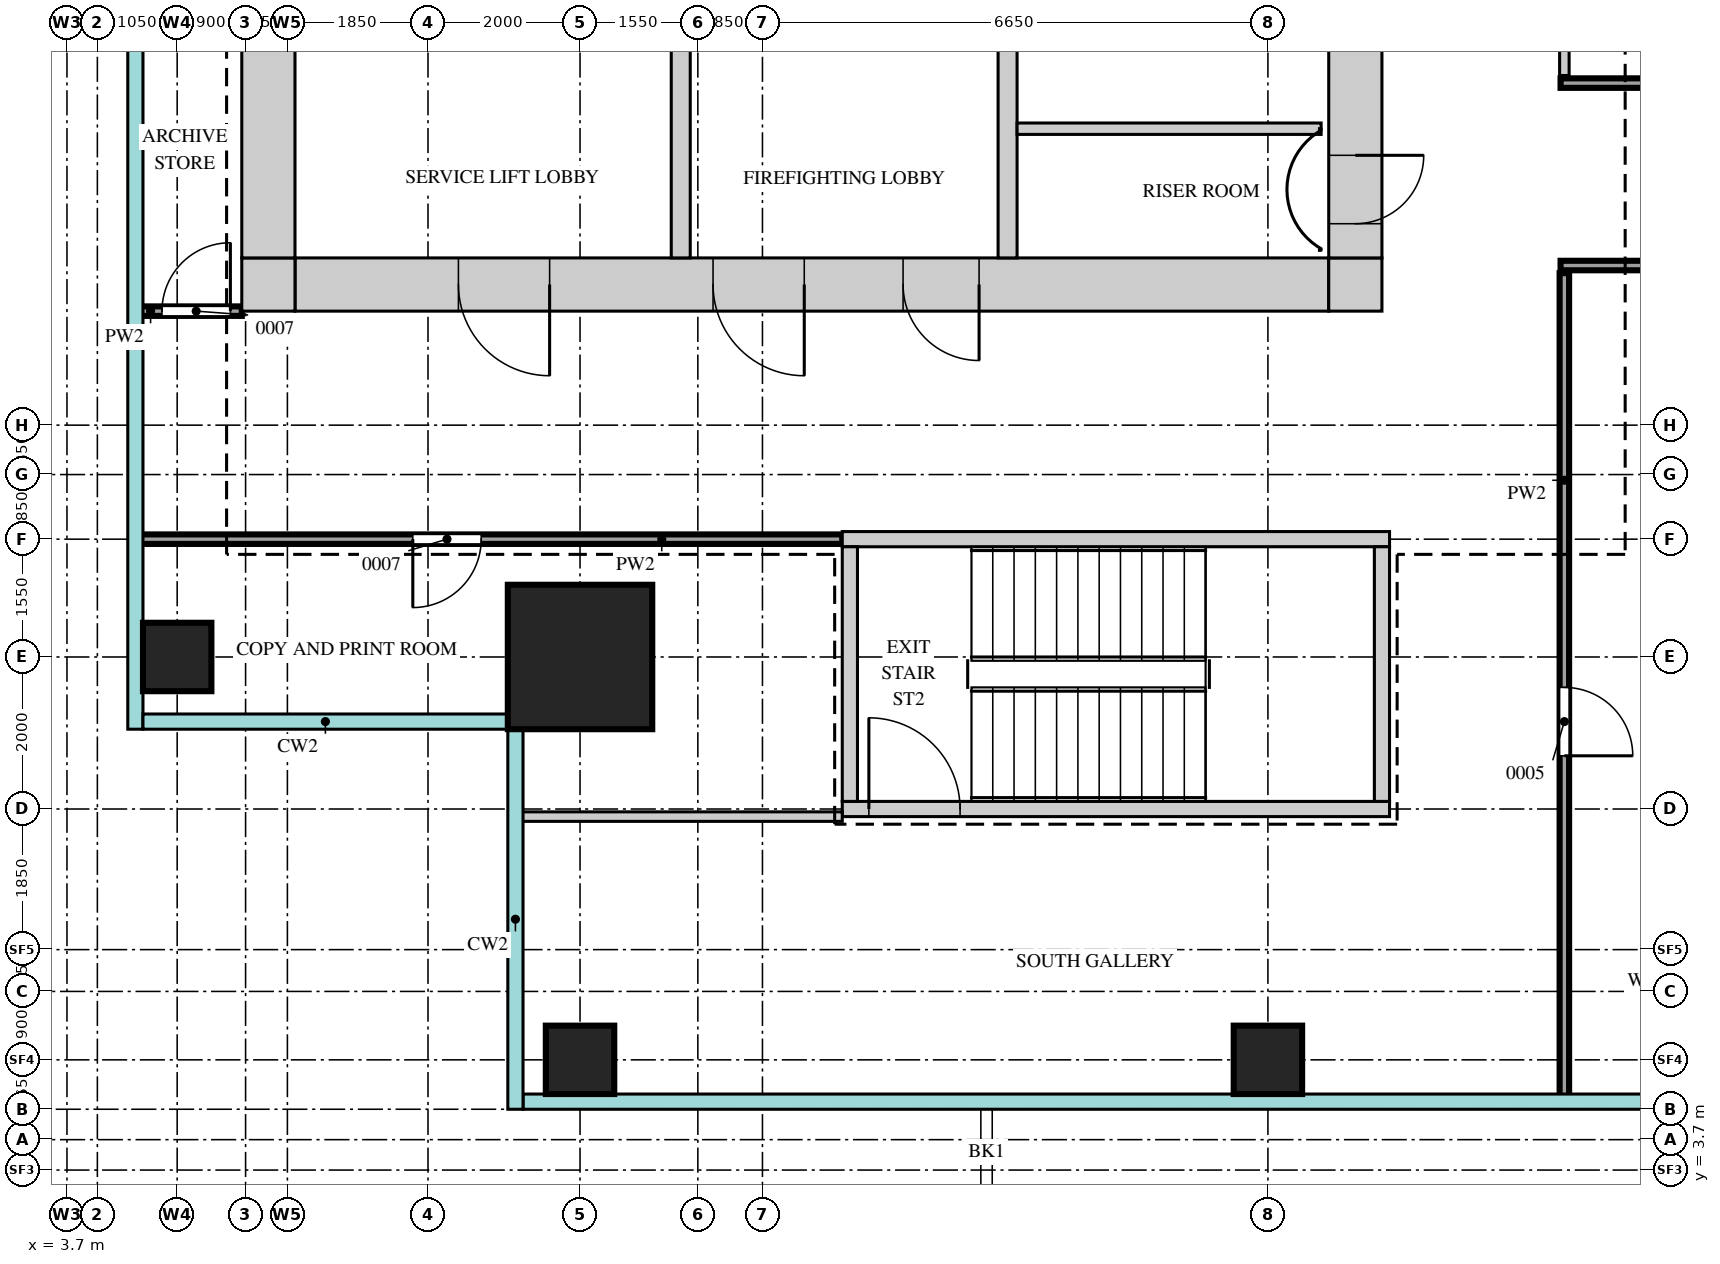
"""IFC4 building model, lengths in metres.
Left out: names, types, materials, properties, quantities, classifications, styles, units other than length and angle.
Written with IfcOpenShell. Run it as: python <this file> out.ifc"""

import sys

from ifc_helpers import new_model, si_unit, direction, frame, frame_2d, origin, origin_2d, place, context, subcontext, project, spatial, rectangle, extrude, source, transform, mapped, element, fill, save


model = new_model("IFC4")
c1 = context("Model", 3, precision=1e-05, world=origin(), true_north=direction((0.0, 1.0)))
c2 = subcontext(c1, "Body", "Model", "MODEL_VIEW")
j1 = project(units=[si_unit("LENGTHUNIT", "METRE"), si_unit("PLANEANGLEUNIT", "RADIAN")], contexts=[c1])
p1 = place(None, origin())
s1 = spatial("IfcSite", under=j1, at=p1, CompositionType="ELEMENT")
p2 = place(p1, origin())
s2 = spatial("IfcBuilding", under=s1, at=p2, CompositionType="ELEMENT")
p3 = place(p2, frame((0.0, 0.0, 226.2)))
s3 = spatial("IfcBuildingStorey", under=s2, at=p3, CompositionType="ELEMENT", Elevation=226.2)
m1 = source(origin(), c2, "Body", "SweptSolid", [
    extrude(rectangle(XDim=13.6, YDim=0.7, at=frame_2d((6.8, 0.0))), origin(), (0.0, 0.0, 1.0), 3.75),
])
p4 = place(p3, frame((6.7, 15.35, 0.0), z_axis=(0.0, 0.0, 1.0), x_axis=(1.0, 0.0, 0.0)))
e1 = element("IfcWall", 1, at=p4, inside=s3, PredefinedType="SHEAR", context=c2, shape_type="MappedRepresentation", body=[
    mapped(m1, transform((0.0, 0.0, 0.0))),
])
m2 = source(origin(), c2, "Body", "SweptSolid", [
    extrude(rectangle(XDim=1.2, YDim=2.1, at=frame_2d((0.6, 1.05))), frame((0.0, 0.36, 0.0), z_axis=(0.0, -1.0, 0.0), x_axis=(1.0, 0.0, 0.0)), (0.0, 0.0, 1.0), 0.72),
])
p5 = place(p4, frame((5.5, 0.0, 0.0)))
e2 = element("IfcOpeningElement", 2, at=p5, cuts=e1, PredefinedType="OPENING", context=c2, shape_type="MappedRepresentation", body=[
    mapped(m2, transform((0.0, 0.0, 0.0))),
])
p6 = place(p4, frame((2.15, 0.0, 0.0)))
e3 = element("IfcOpeningElement", 3, at=p6, cuts=e1, PredefinedType="OPENING", context=c2, shape_type="MappedRepresentation", body=[
    mapped(m2, transform((0.0, 0.0, 0.0))),
])
m3 = source(origin(), c2, "Body", "SweptSolid", [
    extrude(rectangle(XDim=1.0, YDim=2.1, at=frame_2d((0.5, 1.05))), frame((0.0, 0.36, 0.0), z_axis=(0.0, -1.0, 0.0), x_axis=(1.0, 0.0, 0.0)), (0.0, 0.0, 1.0), 0.72),
])
p7 = place(p4, frame((8.0, 0.0, 0.0)))
e4 = element("IfcOpeningElement", 4, at=p7, cuts=e1, PredefinedType="OPENING", context=c2, shape_type="MappedRepresentation", body=[
    mapped(m3, transform((0.0, 0.0, 0.0))),
])
m4 = source(origin(), c2, "Body", "SweptSolid", [
    extrude(rectangle(XDim=0.7, YDim=0.7, at=frame_2d((0.35, 0.0))), origin(), (0.0, 0.0, 1.0), 3.75),
])
for number, where, z_axis, x_axis in (
    (5, (20.3, 15.35, 0.0), (0.0, 0.0, 1.0), (1.0, 0.0, 0.0)),
    (6, (6.0, 15.35, 0.0), (0.0, 0.0, 1.0), (1.0, 0.0, 0.0)),
):
    element("IfcWall", number, at=place(p3, frame(where, z_axis=z_axis, x_axis=x_axis)), inside=s3, PredefinedType="SHEAR", context=c2, shape_type="MappedRepresentation", body=[
        mapped(m4, transform((0.0, 0.0, 0.0))),
    ])
m5 = source(origin(), c2, "Body", "SweptSolid", [
    extrude(rectangle(XDim=22.6, YDim=0.7, at=frame_2d((11.3, 0.0))), origin(), (0.0, 0.0, 1.0), 3.75),
])
p8 = place(p3, frame((20.65, 15.7, 0.0), z_axis=(0.0, 0.0, 1.0), x_axis=(0.0, 1.0, 0.0)))
e7 = element("IfcWall", 7, at=p8, inside=s3, PredefinedType="SHEAR", context=c2, shape_type="MappedRepresentation", body=[
    mapped(m5, transform((0.0, 0.0, 0.0))),
])
m6 = source(origin(), c2, "Body", "SweptSolid", [
    extrude(rectangle(XDim=1.8, YDim=2.1, at=frame_2d((0.9, 1.05))), frame((0.0, 0.36, 0.0), z_axis=(0.0, -1.0, 0.0), x_axis=(1.0, 0.0, 0.0)), (0.0, 0.0, 1.0), 0.72),
])
p9 = place(p8, frame((10.8, 0.0, 0.0)))
e8 = element("IfcOpeningElement", 8, at=p9, cuts=e7, PredefinedType="OPENING", context=c2, shape_type="MappedRepresentation", body=[
    mapped(m6, transform((0.0, 0.0, 0.0))),
])
m7 = source(origin(), c2, "Body", "SweptSolid", [
    extrude(rectangle(XDim=0.9, YDim=2.1, at=frame_2d((0.45, 1.05))), frame((0.0, 0.36, 0.0), z_axis=(0.0, -1.0, 0.0), x_axis=(1.0, 0.0, 0.0)), (0.0, 0.0, 1.0), 0.72),
])
p10 = place(p8, frame((0.45, 0.0, 0.0)))
e9 = element("IfcOpeningElement", 9, at=p10, cuts=e7, PredefinedType="OPENING", context=c2, shape_type="MappedRepresentation", body=[
    mapped(m7, transform((0.0, 0.0, 0.0))),
])
p11 = place(p8, frame((2.9, 0.0, 0.0)))
e10 = element("IfcOpeningElement", 10, at=p11, cuts=e7, PredefinedType="OPENING", context=c2, shape_type="MappedRepresentation", body=[
    mapped(m7, transform((0.0, 0.0, 0.0))),
])
p12 = place(p8, frame((5.65, 0.0, 0.0)))
e11 = element("IfcOpeningElement", 11, at=p12, cuts=e7, PredefinedType="OPENING", context=c2, shape_type="MappedRepresentation", body=[
    mapped(m7, transform((0.0, 0.0, 0.0))),
])
p13 = place(p3, frame((6.35, 15.7, 0.0), z_axis=(0.0, 0.0, 1.0), x_axis=(0.0, 1.0, 0.0)))
e12 = element("IfcWall", 12, at=p13, inside=s3, PredefinedType="SHEAR", context=c2, shape_type="MappedRepresentation", body=[
    mapped(m5, transform((0.0, 0.0, 0.0))),
])
m8 = source(origin(), c2, "Body", "SweptSolid", [
    extrude(rectangle(XDim=7.2, YDim=0.2, at=frame_2d((3.6, 0.0))), origin(), (0.0, 0.0, 1.0), 3.75),
])
p14 = place(p3, frame((13.9, 12.0, 0.0), z_axis=(0.0, 0.0, 1.0), x_axis=(1.0, 0.0, 0.0)))
e13 = element("IfcWall", 13, at=p14, inside=s3, PredefinedType="SHEAR", context=c2, shape_type="MappedRepresentation", body=[
    mapped(m8, transform((0.0, 0.0, 0.0))),
])
p15 = place(p3, frame((13.9, 8.45, 0.0), z_axis=(0.0, 0.0, 1.0), x_axis=(1.0, 0.0, 0.0)))
e14 = element("IfcWall", 14, at=p15, inside=s3, PredefinedType="SHEAR", context=c2, shape_type="MappedRepresentation", body=[
    mapped(m8, transform((0.0, 0.0, 0.0))),
])
m9 = source(origin(), c2, "Body", "SweptSolid", [
    extrude(rectangle(XDim=1.2, YDim=2.1, at=frame_2d((0.6, 1.05))), frame((0.0, 0.11, 0.0), z_axis=(0.0, -1.0, 0.0), x_axis=(1.0, 0.0, 0.0)), (0.0, 0.0, 1.0), 0.22),
])
p16 = place(p15, frame((0.35, 0.0, 0.0)))
e15 = element("IfcOpeningElement", 15, at=p16, cuts=e14, PredefinedType="OPENING", context=c2, shape_type="MappedRepresentation", body=[
    mapped(m9, transform((0.0, 0.0, 0.0))),
])
m10 = source(origin(), c2, "Body", "SweptSolid", [
    extrude(rectangle(XDim=3.35, YDim=0.2, at=frame_2d((1.675, 0.0))), origin(), (0.0, 0.0, 1.0), 3.75),
])
for number, where, z_axis, x_axis in (
    (16, (21.0, 8.55, 0.0), (0.0, 0.0, 1.0), (0.0, 1.0, 0.0)),
    (17, (14.0, 8.55, 0.0), (0.0, 0.0, 1.0), (0.0, 1.0, 0.0)),
):
    element("IfcWall", number, at=place(p3, frame(where, z_axis=z_axis, x_axis=x_axis)), inside=s3, PredefinedType="SHEAR", context=c2, shape_type="MappedRepresentation", body=[
        mapped(m10, transform((0.0, 0.0, 0.0))),
    ])
m11 = source(origin(), c2, "Body", "SweptSolid", [
    extrude(rectangle(XDim=3.5, YDim=0.25, at=frame_2d((1.75, 0.0))), origin(), (0.0, 0.0, 1.0), 3.75),
])
for number, where, z_axis, x_axis in (
    (18, (16.075, 15.7, 0.0), (0.0, 0.0, 1.0), (0.0, 1.0, 0.0)),
    (19, (11.775, 15.7, 0.0), (0.0, 0.0, 1.0), (0.0, 1.0, 0.0)),
):
    element("IfcWall", number, at=place(p3, frame(where, z_axis=z_axis, x_axis=x_axis)), inside=s3, PredefinedType="STANDARD", context=c2, shape_type="MappedRepresentation", body=[
        mapped(m11, transform((0.0, 0.0, 0.0))),
    ])
m12 = source(origin(), c2, "Body", "SweptSolid", [
    extrude(rectangle(XDim=1.9, YDim=1.9, at=origin_2d()), origin(), (0.0, 0.0, 1.0), 4.0),
])
p17 = place(p3, frame((10.45, 10.45, 0.0), z_axis=(0.0, 0.0, 1.0), x_axis=(1.0, 0.0, 0.0)))
e20 = element("IfcColumn", 20, at=p17, inside=s3, PredefinedType="COLUMN", context=c2, shape_type="MappedRepresentation", body=[
    mapped(m12, transform((0.0, 0.0, 0.0))),
])
m13 = source(origin(), c2, "Body", "SweptSolid", [
    extrude(rectangle(XDim=0.9, YDim=0.9, at=origin_2d()), origin(), (0.0, 0.0, 1.0), 3.75),
])
for number, where, z_axis, x_axis in (
    (21, (10.45, 5.15, 0.0), (0.0, 0.0, 1.0), (1.0, 0.0, 0.0)),
    (22, (19.5, 5.15, 0.0), (0.0, 0.0, 1.0), (1.0, 0.0, 0.0)),
    (23, (5.15, 10.45, 0.0), (0.0, 0.0, 1.0), (1.0, 0.0, 0.0)),
):
    element("IfcColumn", number, at=place(p3, frame(where, z_axis=z_axis, x_axis=x_axis)), inside=s3, PredefinedType="COLUMN", context=c2, shape_type="MappedRepresentation", body=[
        mapped(m13, transform((0.0, 0.0, 0.0))),
    ])
m14 = source(origin(), c2, "Body", "SweptSolid", [
    extrude(rectangle(XDim=10.85, YDim=0.125, at=frame_2d((5.425, 0.0))), origin(), (0.0, 0.0, 1.0), 3.8),
])
p18 = place(p3, frame((23.4, 4.65, 0.0), z_axis=(0.0, 0.0, 1.0), x_axis=(0.0, 1.0, 0.0)))
e24 = element("IfcWall", 24, at=p18, inside=s3, PredefinedType="PARTITIONING", context=c2, shape_type="MappedRepresentation", body=[
    mapped(m14, transform((0.0, 0.0, 0.0))),
])
m15 = source(origin(), c2, "Body", "SweptSolid", [
    extrude(rectangle(XDim=0.9, YDim=2.1, at=frame_2d((0.45, 1.05))), frame((0.0, 0.073, 0.0), z_axis=(0.0, -1.0, 0.0), x_axis=(1.0, 0.0, 0.0)), (0.0, 0.0, 1.0), 0.145),
])
p19 = place(p18, frame((4.5, 0.0, 0.0)))
e25 = element("IfcOpeningElement", 25, at=p19, cuts=e24, PredefinedType="OPENING", context=c2, shape_type="MappedRepresentation", body=[
    mapped(m15, transform((0.0, 0.0, 0.0))),
])
m16 = source(origin(), c2, "Body", "SweptSolid", [
    extrude(rectangle(XDim=4.25, YDim=0.125, at=frame_2d((2.125, 0.0))), origin(), (0.0, 0.0, 1.0), 3.8),
])
p20 = place(p3, frame((9.65, 8.35, 0.0), z_axis=(0.0, 0.0, 1.0), x_axis=(1.0, 0.0, 0.0)))
e26 = element("IfcWall", 26, at=p20, inside=s3, PredefinedType="PARTITIONING", context=c2, shape_type="MappedRepresentation", body=[
    mapped(m16, transform((0.0, 0.0, 0.0))),
])
m17 = source(origin(), c2, "Body", "SweptSolid", [
    extrude(rectangle(XDim=9.25, YDim=0.125, at=frame_2d((4.625, 0.0))), origin(), (0.0, 0.0, 1.0), 3.8),
])
p21 = place(p3, frame((4.65, 12.0, 0.0), z_axis=(0.0, 0.0, 1.0), x_axis=(1.0, 0.0, 0.0)))
e27 = element("IfcWall", 27, at=p21, inside=s3, PredefinedType="PARTITIONING", context=c2, shape_type="MappedRepresentation", body=[
    mapped(m17, transform((0.0, 0.0, 0.0))),
])
p22 = place(p21, frame((3.6, 0.0, 0.0)))
e28 = element("IfcOpeningElement", 28, at=p22, cuts=e27, PredefinedType="OPENING", context=c2, shape_type="MappedRepresentation", body=[
    mapped(m15, transform((0.0, 0.0, 0.0))),
])
m18 = source(origin(), c2, "Body", "SweptSolid", [
    extrude(rectangle(XDim=1.35, YDim=0.125, at=frame_2d((0.675, 0.0))), origin(), (0.0, 0.0, 1.0), 3.8),
])
p23 = place(p3, frame((4.65, 15.0, 0.0), z_axis=(0.0, 0.0, 1.0), x_axis=(1.0, 0.0, 0.0)))
e29 = element("IfcWall", 29, at=p23, inside=s3, PredefinedType="PARTITIONING", context=c2, shape_type="MappedRepresentation", body=[
    mapped(m18, transform((0.0, 0.0, 0.0))),
])
p24 = place(p23, frame((0.3, 0.0, 0.0)))
e30 = element("IfcOpeningElement", 30, at=p24, cuts=e29, PredefinedType="OPENING", context=c2, shape_type="MappedRepresentation", body=[
    mapped(m15, transform((0.0, 0.0, 0.0))),
])
m19 = source(origin(), c2, "Body", "SweptSolid", [
    extrude(rectangle(XDim=26.0, YDim=0.125, at=frame_2d((13.0, 0.0))), origin(), (0.0, 0.0, 1.0), 3.8),
])
p25 = place(p3, frame((23.35, 15.6, 0.0), z_axis=(0.0, 0.0, 1.0), x_axis=(1.0, 0.0, 0.0)))
e31 = element("IfcWall", 31, at=p25, inside=s3, PredefinedType="PARTITIONING", context=c2, shape_type="MappedRepresentation", body=[
    mapped(m19, transform((0.0, 0.0, 0.0))),
])
p26 = place(p25, frame((4.05, 0.0, 0.0)))
e32 = element("IfcOpeningElement", 32, at=p26, cuts=e31, PredefinedType="OPENING", context=c2, shape_type="MappedRepresentation", body=[
    mapped(m15, transform((0.0, 0.0, 0.0))),
])
m20 = source(origin(), c2, "Body", "SweptSolid", [
    extrude(rectangle(XDim=1.0, YDim=2.1, at=frame_2d((0.5, 1.05))), frame((0.0, 0.073, 0.0), z_axis=(0.0, -1.0, 0.0), x_axis=(1.0, 0.0, 0.0)), (0.0, 0.0, 1.0), 0.145),
])
p27 = place(p25, frame((6.85, 0.0, 0.0)))
e33 = element("IfcOpeningElement", 33, at=p27, cuts=e31, PredefinedType="OPENING", context=c2, shape_type="MappedRepresentation", body=[
    mapped(m20, transform((0.0, 0.0, 0.0))),
])
p28 = place(p25, frame((9.25, 0.0, 0.0)))
e34 = element("IfcOpeningElement", 34, at=p28, cuts=e31, PredefinedType="OPENING", context=c2, shape_type="MappedRepresentation", body=[
    mapped(m15, transform((0.0, 0.0, 0.0))),
])
p29 = place(p25, frame((15.1, 0.0, 0.0)))
e35 = element("IfcOpeningElement", 35, at=p29, cuts=e31, PredefinedType="OPENING", context=c2, shape_type="MappedRepresentation", body=[
    mapped(m15, transform((0.0, 0.0, 0.0))),
])
p30 = place(p25, frame((22.6, 0.0, 0.0)))
e36 = element("IfcOpeningElement", 36, at=p30, cuts=e31, PredefinedType="OPENING", context=c2, shape_type="MappedRepresentation", body=[
    mapped(m15, transform((0.0, 0.0, 0.0))),
])
m21 = source(origin(), c2, "Body", "SweptSolid", [
    extrude(rectangle(XDim=4.0, YDim=0.15, at=frame_2d((2.0, 0.0))), origin(), (0.0, 0.0, 1.0), 3.8),
])
p31 = place(p3, frame((16.2, 17.4, 0.0), z_axis=(0.0, 0.0, 1.0), x_axis=(1.0, 0.0, 0.0)))
e37 = element("IfcWall", 37, at=p31, inside=s3, PredefinedType="PARTITIONING", context=c2, shape_type="MappedRepresentation", body=[
    mapped(m21, transform((0.0, 0.0, 0.0))),
])
p32 = place(p3, frame((23.35, 18.0, 0.0), z_axis=(0.0, 0.0, 1.0), x_axis=(1.0, 0.0, 0.0)))
e38 = element("IfcWall", 38, at=p32, inside=s3, PredefinedType="PARTITIONING", context=c2, shape_type="MappedRepresentation", body=[
    mapped(m19, transform((0.0, 0.0, 0.0))),
])
m22 = source(origin(), c2, "Body", "SweptSolid", [
    extrude(rectangle(XDim=1.2, YDim=2.1, at=frame_2d((0.6, 1.05))), frame((0.0, 0.073, 0.0), z_axis=(0.0, -1.0, 0.0), x_axis=(1.0, 0.0, 0.0)), (0.0, 0.0, 1.0), 0.145),
])
p33 = place(p32, frame((11.55, 0.0, 0.0)))
e39 = element("IfcOpeningElement", 39, at=p33, cuts=e38, PredefinedType="OPENING", context=c2, shape_type="MappedRepresentation", body=[
    mapped(m22, transform((0.0, 0.0, 0.0))),
])
p34 = place(p32, frame((21.3, 0.0, 0.0)))
e40 = element("IfcOpeningElement", 40, at=p34, cuts=e38, PredefinedType="OPENING", context=c2, shape_type="MappedRepresentation", body=[
    mapped(m22, transform((0.0, 0.0, 0.0))),
])
m23 = source(origin(), c2, "Body", "SweptSolid", [
    extrude(rectangle(XDim=18.4, YDim=0.125, at=frame_2d((9.2, 0.0))), origin(), (0.0, 0.0, 1.0), 3.8),
])
p35 = place(p3, frame((23.4, 18.1, 0.0), z_axis=(0.0, 0.0, 1.0), x_axis=(0.0, 1.0, 0.0)))
e41 = element("IfcWall", 41, at=p35, inside=s3, PredefinedType="PARTITIONING", context=c2, shape_type="MappedRepresentation", body=[
    mapped(m23, transform((0.0, 0.0, 0.0))),
])
p36 = place(p35, frame((8.6, 0.0, 0.0)))
e42 = element("IfcOpeningElement", 42, at=p36, cuts=e41, PredefinedType="OPENING", context=c2, shape_type="MappedRepresentation", body=[
    mapped(m22, transform((0.0, 0.0, 0.0))),
])
m24 = source(origin(), c2, "Body", "SweptSolid", [
    extrude(rectangle(XDim=0.9, YDim=2.1, at=frame_2d((0.45, 1.05))), frame((0.0, 0.3, 0.0), z_axis=(0.0, -1.0, 0.0), x_axis=(1.0, 0.0, 0.0)), (0.0, 0.0, 1.0), 0.6),
])
p37 = place(p10, origin())
e43 = element("IfcDoor", 43, at=p37, inside=s3, OperationType="SINGLE_SWING_RIGHT", PredefinedType="DOOR", context=c2, shape_type="MappedRepresentation", body=[
    mapped(m24, transform((0.0, 0.0, 0.0))),
])
fill(e9, e43)
m25 = source(origin(), c2, "Body", "SweptSolid", [
    extrude(rectangle(XDim=1.2, YDim=2.1, at=frame_2d((0.6, 1.05))), frame((0.0, 0.3, 0.0), z_axis=(0.0, -1.0, 0.0), x_axis=(1.0, 0.0, 0.0)), (0.0, 0.0, 1.0), 0.6),
])
p38 = place(p5, origin())
e44 = element("IfcDoor", 44, at=p38, inside=s3, OperationType="SINGLE_SWING_RIGHT", PredefinedType="DOOR", context=c2, shape_type="MappedRepresentation", body=[
    mapped(m25, transform((0.0, 0.0, 0.0))),
])
fill(e2, e44)
p39 = place(p6, origin())
e45 = element("IfcDoor", 45, at=p39, inside=s3, OperationType="SINGLE_SWING_RIGHT", PredefinedType="DOOR", context=c2, shape_type="MappedRepresentation", body=[
    mapped(m25, transform((0.0, 0.0, 0.0))),
])
fill(e3, e45)
m26 = source(origin(), c2, "Body", "SweptSolid", [
    extrude(rectangle(XDim=1.0, YDim=2.1, at=frame_2d((0.5, 1.05))), frame((0.0, 0.3, 0.0), z_axis=(0.0, -1.0, 0.0), x_axis=(1.0, 0.0, 0.0)), (0.0, 0.0, 1.0), 0.6),
])
p40 = place(p7, origin())
e46 = element("IfcDoor", 46, at=p40, inside=s3, OperationType="SINGLE_SWING_RIGHT", PredefinedType="DOOR", context=c2, shape_type="MappedRepresentation", body=[
    mapped(m26, transform((0.0, 0.0, 0.0))),
])
fill(e4, e46)
m27 = source(origin(), c2, "Body", "SweptSolid", [
    extrude(rectangle(XDim=0.9, YDim=2.1, at=frame_2d((0.45, 1.05))), frame((0.0, 0.025, 0.0), z_axis=(0.0, -1.0, 0.0), x_axis=(1.0, 0.0, 0.0)), (0.0, 0.0, 1.0), 0.05),
])
p41 = place(p24, origin())
e47 = element("IfcDoor", 47, at=p41, inside=s3, OperationType="SINGLE_SWING_LEFT", PredefinedType="DOOR", context=c2, shape_type="MappedRepresentation", body=[
    mapped(m27, transform((0.0, 0.0, 0.0))),
])
fill(e30, e47)
p42 = place(p22, origin())
e48 = element("IfcDoor", 48, at=p42, inside=s3, OperationType="SINGLE_SWING_LEFT", PredefinedType="DOOR", context=c2, shape_type="MappedRepresentation", body=[
    mapped(m27, transform((0.0, 0.0, 0.0))),
])
fill(e28, e48)
p43 = place(p19, origin())
e49 = element("IfcDoor", 49, at=p43, inside=s3, OperationType="SINGLE_SWING_LEFT", PredefinedType="DOOR", context=c2, shape_type="MappedRepresentation", body=[
    mapped(m27, transform((0.0, 0.0, 0.0))),
])
fill(e25, e49)
m28 = source(origin(), c2, "Body", "SweptSolid", [
    extrude(rectangle(XDim=1.2, YDim=2.1, at=frame_2d((0.6, 1.05))), frame((0.0, 0.025, 0.0), z_axis=(0.0, -1.0, 0.0), x_axis=(1.0, 0.0, 0.0)), (0.0, 0.0, 1.0), 0.05),
])
p44 = place(p16, origin())
e50 = element("IfcDoor", 50, at=p44, inside=s3, OperationType="SINGLE_SWING_RIGHT", PredefinedType="DOOR", context=c2, shape_type="MappedRepresentation", body=[
    mapped(m28, transform((0.0, 0.0, 0.0))),
])
fill(e15, e50)
save(model, sys.argv[1])
